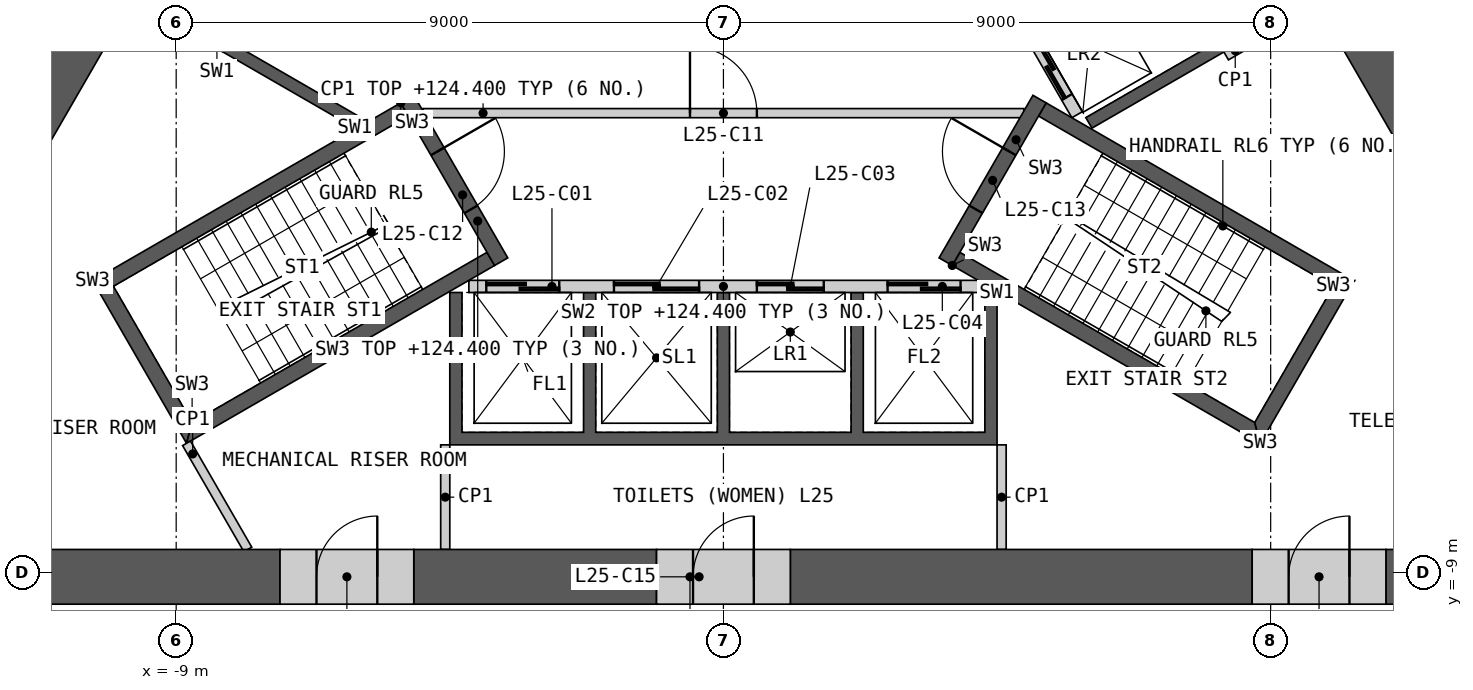
"""IFC4 building model, lengths in metres.
Left out: names, types, materials, properties, quantities, classifications, styles, units other than length and angle.
Written with IfcOpenShell. Run it as: python <this file> out.ifc"""

import sys

from ifc_helpers import new_model, si_unit, direction, frame, frame_2d, origin, place, context, subcontext, project, spatial, polyline, rectangle, outline, extrude, element, fill, save


model = new_model("IFC4")
c1 = context("Model", 3, precision=1e-05, world=origin(), true_north=direction((0.0, 1.0)))
c2 = subcontext(c1, "Body", "Model", "MODEL_VIEW")
j1 = project(units=[si_unit("LENGTHUNIT", "METRE"), si_unit("PLANEANGLEUNIT", "RADIAN")], contexts=[c1])
p1 = place(None, origin())
s1 = spatial("IfcSite", under=j1, at=p1, CompositionType="ELEMENT")
p2 = place(p1, origin())
s2 = spatial("IfcBuilding", under=s1, at=p2, CompositionType="ELEMENT")
p3 = place(p2, frame((0.0, 0.0, 120.6)))
s3 = spatial("IfcBuildingStorey", under=s2, at=p3, CompositionType="ELEMENT", Elevation=120.6)
p4 = place(p3, origin())
e1 = element("IfcWall", 1, at=p4, inside=s3, PredefinedType="SHEAR", context=c2, shape_type="SweptSolid", body=[
    extrude(outline(polyline([(4.5, -4.4), (4.5, -6.906), (-4.5, -6.906), (-4.5, -4.4), (-4.3, -4.4), (-4.3, -6.7), (-2.3, -6.7), (-2.3, -4.4), (-2.1, -4.4), (-2.1, -6.7), (-0.1, -6.7), (-0.1, -4.4), (0.1, -4.4), (0.1, -6.7), (2.1, -6.7), (2.1, -4.4), (2.3, -4.4), (2.3, -6.7), (4.3, -6.7), (4.3, -4.4), (4.5, -4.4)])), origin(), (0.0, 0.0, 1.0), 3.8),
])
p5 = place(p3, frame((-4.187, -4.3, 0.0), z_axis=(0.0, 0.0, 1.0), x_axis=(1.0, 0.0, 0.0)))
e2 = element("IfcWall", 2, at=p5, inside=s3, PredefinedType="SOLIDWALL", context=c2, shape_type="SweptSolid", body=[
    extrude(rectangle(XDim=8.373, YDim=0.2, at=frame_2d((4.187, 0.0))), origin(), (0.0, 0.0, 1.0), 3.8),
])
p6 = place(p5, frame((0.287, 0.0, 0.0)))
e3 = element("IfcOpeningElement", 3, at=p6, cuts=e2, PredefinedType="OPENING", context=c2, shape_type="SweptSolid", body=[
    extrude(rectangle(XDim=1.2, YDim=2.1, at=frame_2d((0.6, 1.05))), frame((0.0, 0.11, 0.0), z_axis=(0.0, -1.0, 0.0), x_axis=(1.0, 0.0, 0.0)), (0.0, 0.0, 1.0), 0.22),
])
p7 = place(p5, frame((2.387, 0.0, 0.0)))
e4 = element("IfcOpeningElement", 4, at=p7, cuts=e2, PredefinedType="OPENING", context=c2, shape_type="SweptSolid", body=[
    extrude(rectangle(XDim=1.4, YDim=2.1, at=frame_2d((0.7, 1.05))), frame((0.0, 0.11, 0.0), z_axis=(0.0, -1.0, 0.0), x_axis=(1.0, 0.0, 0.0)), (0.0, 0.0, 1.0), 0.22),
])
p8 = place(p5, frame((4.737, 0.0, 0.0)))
e5 = element("IfcOpeningElement", 5, at=p8, cuts=e2, PredefinedType="OPENING", context=c2, shape_type="SweptSolid", body=[
    extrude(rectangle(XDim=1.1, YDim=2.1, at=frame_2d((0.55, 1.05))), frame((0.0, 0.11, 0.0), z_axis=(0.0, -1.0, 0.0), x_axis=(1.0, 0.0, 0.0)), (0.0, 0.0, 1.0), 0.22),
])
p9 = place(p5, frame((6.887, 0.0, 0.0)))
e6 = element("IfcOpeningElement", 6, at=p9, cuts=e2, PredefinedType="OPENING", context=c2, shape_type="SweptSolid", body=[
    extrude(rectangle(XDim=1.2, YDim=2.1, at=frame_2d((0.6, 1.05))), frame((0.0, 0.11, 0.0), z_axis=(0.0, -1.0, 0.0), x_axis=(1.0, 0.0, 0.0)), (0.0, 0.0, 1.0), 0.22),
])
p10 = place(p3, origin())
e7 = element("IfcWall", 7, at=p10, inside=s3, PredefinedType="SHEAR", context=c2, shape_type="SweptSolid", body=[
    extrude(outline(polyline([(2.66, 4.192), (4.831, 5.445), (8.231, -0.444), (6.061, -1.697), (5.96, -1.524), (7.952, -0.374), (6.952, 1.358), (4.96, 0.208), (4.861, 0.381), (6.852, 1.531), (5.852, 3.263), (3.861, 2.113), (3.76, 2.287), (5.752, 3.437), (4.752, 5.169), (2.76, 4.019), (2.66, 4.192)])), origin(), (0.0, 0.0, 1.0), 3.8),
])
p11 = place(p3, frame((5.817, -1.476, 0.0), z_axis=(0.0, 0.0, 1.0), x_axis=(-0.500002616675, 0.866023893041, 0.0)))
e8 = element("IfcWall", 8, at=p11, inside=s3, PredefinedType="SOLIDWALL", context=c2, shape_type="SweptSolid", body=[
    extrude(rectangle(XDim=8.373, YDim=0.2, at=frame_2d((4.187, 0.0))), origin(), (0.0, 0.0, 1.0), 3.8),
])
p12 = place(p11, frame((0.337, 0.0, 0.0)))
e9 = element("IfcOpeningElement", 9, at=p12, cuts=e8, PredefinedType="OPENING", context=c2, shape_type="SweptSolid", body=[
    extrude(rectangle(XDim=1.1, YDim=2.1, at=frame_2d((0.55, 1.05))), frame((0.0, 0.11, 0.0), z_axis=(0.0, -1.0, 0.0), x_axis=(1.0, 0.0, 0.0)), (0.0, 0.0, 1.0), 0.22),
])
p13 = place(p11, frame((2.537, 0.0, 0.0)))
e10 = element("IfcOpeningElement", 10, at=p13, cuts=e8, PredefinedType="OPENING", context=c2, shape_type="SweptSolid", body=[
    extrude(rectangle(XDim=1.1, YDim=2.1, at=frame_2d((0.55, 1.05))), frame((0.0, 0.11, 0.0), z_axis=(0.0, -1.0, 0.0), x_axis=(1.0, 0.0, 0.0)), (0.0, 0.0, 1.0), 0.22),
])
p14 = place(p11, frame((4.737, 0.0, 0.0)))
e11 = element("IfcOpeningElement", 11, at=p14, cuts=e8, PredefinedType="OPENING", context=c2, shape_type="SweptSolid", body=[
    extrude(rectangle(XDim=1.1, YDim=2.1, at=frame_2d((0.55, 1.05))), frame((0.0, 0.11, 0.0), z_axis=(0.0, -1.0, 0.0), x_axis=(1.0, 0.0, 0.0)), (0.0, 0.0, 1.0), 0.22),
])
p15 = place(p11, frame((7.037, 0.0, 0.0)))
e12 = element("IfcOpeningElement", 12, at=p15, cuts=e8, PredefinedType="OPENING", context=c2, shape_type="SweptSolid", body=[
    extrude(rectangle(XDim=0.9, YDim=2.1, at=frame_2d((0.45, 1.05))), frame((0.0, 0.11, 0.0), z_axis=(0.0, -1.0, 0.0), x_axis=(1.0, 0.0, 0.0)), (0.0, 0.0, 1.0), 0.22),
])
p16 = place(p3, origin())
e13 = element("IfcWall", 13, at=p16, inside=s3, PredefinedType="SHEAR", context=c2, shape_type="SweptSolid", body=[
    extrude(outline(polyline([(-6.061, -1.697), (-8.231, -0.444), (-8.131, -0.271), (-5.96, -1.524), (-6.061, -1.697)])), origin(), (0.0, 0.0, 1.0), 3.8),
])
p17 = place(p3, frame((-4.941, -1.45, 0.0), z_axis=(0.0, 0.0, 1.0), x_axis=(1.0, 0.0, 0.0)))
e14 = element("IfcWall", 14, at=p17, inside=s3, PredefinedType="PARTITIONING", context=c2, shape_type="SweptSolid", body=[
    extrude(rectangle(XDim=9.882, YDim=0.15, at=frame_2d((4.941, 0.0))), origin(), (0.0, 0.0, 1.0), 3.8),
])
p18 = place(p17, frame((4.391, 0.0, 0.0)))
e15 = element("IfcOpeningElement", 15, at=p18, cuts=e14, PredefinedType="OPENING", context=c2, shape_type="SweptSolid", body=[
    extrude(rectangle(XDim=1.1, YDim=2.1, at=frame_2d((0.55, 1.05))), frame((0.0, 0.085, 0.0), z_axis=(0.0, -1.0, 0.0), x_axis=(1.0, 0.0, 0.0)), (0.0, 0.0, 1.0), 0.17),
])
p19 = place(p3, origin())
e16 = element("IfcWall", 16, at=p19, inside=s3, PredefinedType="SHEAR", context=c2, shape_type="SweptSolid", body=[
    extrude(outline(polyline([(-5.307, -1.281), (-10.374, -4.206), (-10.032, -4.298), (-5.182, -1.498), (-5.307, -1.281)])), origin(), (0.0, 0.0, 1.0), 3.8),
])
p20 = place(p3, origin())
e17 = element("IfcWall", 17, at=p20, inside=s3, PredefinedType="SHEAR", context=c2, shape_type="SweptSolid", body=[
    extrude(outline(polyline([(-10.374, -4.206), (-8.83, -6.881), (-8.738, -6.539), (-10.032, -4.298), (-10.374, -4.206)])), origin(), (0.0, 0.0, 1.0), 3.8),
])
p21 = place(p3, origin())
e18 = element("IfcWall", 18, at=p21, inside=s3, PredefinedType="SHEAR", context=c2, shape_type="SweptSolid", body=[
    extrude(outline(polyline([(-8.738, -6.539), (-8.83, -6.881), (-3.763, -3.956), (-3.888, -3.739), (-8.738, -6.539)])), origin(), (0.0, 0.0, 1.0), 3.8),
])
p22 = place(p3, frame((-5.199, -1.219, 0.0), z_axis=(0.0, 0.0, 1.0), x_axis=(0.499982516597, -0.866035497597, 0.0)))
e19 = element("IfcWall", 19, at=p22, inside=s3, PredefinedType="SHEAR", context=c2, shape_type="SweptSolid", body=[
    extrude(rectangle(XDim=3.088, YDim=0.25, at=frame_2d((1.544, 0.0))), origin(), (0.0, 0.0, 1.0), 3.8),
])
p23 = place(p22, frame((0.994, 0.0, 0.0)))
e20 = element("IfcOpeningElement", 20, at=p23, cuts=e19, PredefinedType="OPENING", context=c2, shape_type="SweptSolid", body=[
    extrude(rectangle(XDim=1.1, YDim=2.1, at=frame_2d((0.55, 1.05))), frame((0.0, 0.135, 0.0), z_axis=(0.0, -1.0, 0.0), x_axis=(1.0, 0.0, 0.0)), (0.0, 0.0, 1.0), 0.27),
])
p24 = place(p3, origin())
e21 = element("IfcWall", 21, at=p24, inside=s3, PredefinedType="SHEAR", context=c2, shape_type="SweptSolid", body=[
    extrude(outline(polyline([(3.763, -3.956), (8.83, -6.881), (8.738, -6.539), (3.888, -3.739), (3.763, -3.956)])), origin(), (0.0, 0.0, 1.0), 3.8),
])
p25 = place(p3, origin())
e22 = element("IfcWall", 22, at=p25, inside=s3, PredefinedType="SHEAR", context=c2, shape_type="SweptSolid", body=[
    extrude(outline(polyline([(8.83, -6.881), (10.374, -4.206), (10.032, -4.298), (8.738, -6.539), (8.83, -6.881)])), origin(), (0.0, 0.0, 1.0), 3.8),
])
p26 = place(p3, origin())
e23 = element("IfcWall", 23, at=p26, inside=s3, PredefinedType="SHEAR", context=c2, shape_type="SweptSolid", body=[
    extrude(outline(polyline([(10.032, -4.298), (10.374, -4.206), (5.307, -1.281), (5.182, -1.498), (10.032, -4.298)])), origin(), (0.0, 0.0, 1.0), 3.8),
])
p27 = place(p3, frame((3.655, -3.893, 0.0), z_axis=(0.0, 0.0, 1.0), x_axis=(0.499982516597, 0.866035497597, 0.0)))
e24 = element("IfcWall", 24, at=p27, inside=s3, PredefinedType="SHEAR", context=c2, shape_type="SweptSolid", body=[
    extrude(rectangle(XDim=3.088, YDim=0.25, at=frame_2d((1.544, 0.0))), origin(), (0.0, 0.0, 1.0), 3.8),
])
p28 = place(p27, frame((0.994, 0.0, 0.0)))
e25 = element("IfcOpeningElement", 25, at=p28, cuts=e24, PredefinedType="OPENING", context=c2, shape_type="SweptSolid", body=[
    extrude(rectangle(XDim=1.1, YDim=2.1, at=frame_2d((0.55, 1.05))), frame((0.0, 0.135, 0.0), z_axis=(0.0, -1.0, 0.0), x_axis=(1.0, 0.0, 0.0)), (0.0, 0.0, 1.0), 0.27),
])
for number, where, z_axis, x_axis in (
    (26, (4.575, -6.906, 0.0), (0.0, 0.0, 1.0), (0.0, -1.0, 0.0)),
    (27, (-4.575, -6.906, 0.0), (0.0, 0.0, 1.0), (0.0, -1.0, 0.0)),
    (28, (8.268, -0.509, 0.0), (0.0, 0.0, 1.0), (0.866, 0.5, 0.0)),
):
    element("IfcWall", number, at=place(p3, frame(where, z_axis=z_axis, x_axis=x_axis)), inside=s3, PredefinedType="PARTITIONING", context=c2, shape_type="SweptSolid", body=[
        extrude(rectangle(XDim=1.72, YDim=0.15, at=frame_2d((0.86, 0.0))), origin(), (0.0, 0.0, 1.0), 3.8),
    ])
p29 = place(p3, frame((-8.83, -6.881, 0.0), z_axis=(0.0, 0.0, 1.0), x_axis=(0.500085890408, -0.865975809255, 0.0)))
e29 = element("IfcWall", 29, at=p29, inside=s3, PredefinedType="PARTITIONING", context=c2, shape_type="SweptSolid", body=[
    extrude(rectangle(XDim=2.016, YDim=0.15, at=frame_2d((1.008, 0.0))), origin(), (0.0, 0.0, 1.0), 3.8),
])
p30 = place(p3, frame((-14.941, -9.076, 0.0), z_axis=(0.0, 0.0, 1.0), x_axis=(1.0, 0.0, 0.0)))
e30 = element("IfcWall", 30, at=p30, inside=s3, PredefinedType="SHEAR", context=c2, shape_type="SweptSolid", body=[
    extrude(rectangle(XDim=7.649, YDim=0.9, at=frame_2d((3.824, 0.0))), origin(), (0.0, 0.0, 1.0), 3.8),
])
p31 = place(p3, frame((1.1, -9.076, 0.0), z_axis=(0.0, 0.0, 1.0), x_axis=(1.0, 0.0, 0.0)))
e31 = element("IfcWall", 31, at=p31, inside=s3, PredefinedType="SHEAR", context=c2, shape_type="SweptSolid", body=[
    extrude(rectangle(XDim=7.595, YDim=0.9, at=frame_2d((3.798, 0.0))), origin(), (0.0, 0.0, 1.0), 3.8),
])
p32 = place(p3, frame((10.896, -9.076, 0.0), z_axis=(0.0, 0.0, 1.0), x_axis=(1.0, 0.0, 0.0)))
e32 = element("IfcWall", 32, at=p32, inside=s3, PredefinedType="SHEAR", context=c2, shape_type="SweptSolid", body=[
    extrude(rectangle(XDim=4.046, YDim=0.9, at=frame_2d((2.023, 0.0))), origin(), (0.0, 0.0, 1.0), 3.8),
])
p33 = place(p3, frame((-5.093, -9.076, 0.0), z_axis=(0.0, 0.0, 1.0), x_axis=(1.0, 0.0, 0.0)))
e33 = element("IfcWall", 33, at=p33, inside=s3, PredefinedType="SHEAR", context=c2, shape_type="SweptSolid", body=[
    extrude(rectangle(XDim=3.992, YDim=0.9, at=frame_2d((1.996, 0.0))), origin(), (0.0, 0.0, 1.0), 3.8),
])
p34 = place(p3, frame((15.331, -8.401, 0.0), z_axis=(0.0, 0.0, 1.0), x_axis=(-0.49999216708, 0.866029926076, 0.0)))
e34 = element("IfcWall", 34, at=p34, inside=s3, PredefinedType="SHEAR", context=c2, shape_type="SweptSolid", body=[
    extrude(rectangle(XDim=12.641, YDim=0.9, at=frame_2d((6.321, 0.0))), origin(), (0.0, 0.0, 1.0), 3.8),
])
p35 = place(p3, frame((-10.06, 0.728, 0.0), z_axis=(0.0, 0.0, 1.0), x_axis=(-0.500021220092, -0.866013152012, 0.0)))
e35 = element("IfcWall", 35, at=p35, inside=s3, PredefinedType="SHEAR", context=c2, shape_type="SweptSolid", body=[
    extrude(rectangle(XDim=4.22, YDim=0.9, at=frame_2d((2.11, 0.0))), origin(), (0.0, 0.0, 1.0), 3.8),
])
p36 = place(p3, frame((-1.1, -9.076, 0.0), z_axis=(0.0, 0.0, 1.0), x_axis=(1.0, 0.0, 0.0)))
e36 = element("IfcWall", 36, at=p36, inside=s3, PredefinedType="SHEAR", context=c2, shape_type="SweptSolid", body=[
    extrude(rectangle(XDim=2.2, YDim=0.9, at=frame_2d((1.1, 0.0))), origin(), (0.0, 0.0, 1.0), 3.8),
])
p37 = place(p36, frame((0.6, 0.0, 0.0)))
e37 = element("IfcOpeningElement", 37, at=p37, cuts=e36, PredefinedType="OPENING", context=c2, shape_type="SweptSolid", body=[
    extrude(rectangle(XDim=1.0, YDim=2.1, at=frame_2d((0.5, 1.05))), frame((0.0, 0.46, 0.0), z_axis=(0.0, -1.0, 0.0), x_axis=(1.0, 0.0, 0.0)), (0.0, 0.0, 1.0), 0.92),
])
p38 = place(p3, frame((8.696, -9.076, 0.0), z_axis=(0.0, 0.0, 1.0), x_axis=(1.0, 0.0, 0.0)))
e38 = element("IfcWall", 38, at=p38, inside=s3, PredefinedType="SHEAR", context=c2, shape_type="SweptSolid", body=[
    extrude(rectangle(XDim=2.2, YDim=0.9, at=frame_2d((1.1, 0.0))), origin(), (0.0, 0.0, 1.0), 3.8),
])
p39 = place(p38, frame((0.6, 0.0, 0.0)))
e39 = element("IfcOpeningElement", 39, at=p39, cuts=e38, PredefinedType="OPENING", context=c2, shape_type="SweptSolid", body=[
    extrude(rectangle(XDim=1.0, YDim=2.1, at=frame_2d((0.5, 1.05))), frame((0.0, 0.46, 0.0), z_axis=(0.0, -1.0, 0.0), x_axis=(1.0, 0.0, 0.0)), (0.0, 0.0, 1.0), 0.92),
])
p40 = place(p3, frame((-7.292, -9.076, 0.0), z_axis=(0.0, 0.0, 1.0), x_axis=(1.0, 0.0, 0.0)))
e40 = element("IfcWall", 40, at=p40, inside=s3, PredefinedType="SHEAR", context=c2, shape_type="SweptSolid", body=[
    extrude(rectangle(XDim=2.2, YDim=0.9, at=frame_2d((1.1, 0.0))), origin(), (0.0, 0.0, 1.0), 3.8),
])
p41 = place(p40, frame((0.6, 0.0, 0.0)))
e41 = element("IfcOpeningElement", 41, at=p41, cuts=e40, PredefinedType="OPENING", context=c2, shape_type="SweptSolid", body=[
    extrude(rectangle(XDim=1.0, YDim=2.1, at=frame_2d((0.5, 1.05))), frame((0.0, 0.46, 0.0), z_axis=(0.0, -1.0, 0.0), x_axis=(1.0, 0.0, 0.0)), (0.0, 0.0, 1.0), 0.92),
])
p42 = place(p3, frame((10.46, 5.736, 0.0), z_axis=(0.0, 0.0, 1.0), x_axis=(0.500004141693, -0.866023012564, 0.0)))
e42 = element("IfcWall", 42, at=p42, inside=s3, PredefinedType="PARTITIONING", context=c2, shape_type="SweptSolid", body=[
    extrude(rectangle(XDim=9.803, YDim=0.2, at=frame_2d((4.902, 0.0))), origin(), (0.0, 0.0, 1.0), 3.8),
])
p43 = place(p42, frame((4.352, 0.0, 0.0)))
e43 = element("IfcOpeningElement", 43, at=p43, cuts=e42, PredefinedType="OPENING", context=c2, shape_type="SweptSolid", body=[
    extrude(rectangle(XDim=1.0, YDim=2.1, at=frame_2d((0.5, 1.05))), frame((0.0, 0.11, 0.0), z_axis=(0.0, -1.0, 0.0), x_axis=(1.0, 0.0, 0.0)), (0.0, 0.0, 1.0), 0.22),
])
p44 = place(p3, frame((-15.402, -2.823, 0.0), z_axis=(0.0, 0.0, 1.0), x_axis=(0.500023237168, 0.866011987384, 0.0)))
e44 = element("IfcWall", 44, at=p44, inside=s3, PredefinedType="PARTITIONING", context=c2, shape_type="SweptSolid", body=[
    extrude(rectangle(XDim=9.883, YDim=0.2, at=frame_2d((4.942, 0.0))), origin(), (0.0, 0.0, 1.0), 3.8),
])
p45 = place(p44, frame((4.492, 0.0, 0.0)))
e45 = element("IfcOpeningElement", 45, at=p45, cuts=e44, PredefinedType="OPENING", context=c2, shape_type="SweptSolid", body=[
    extrude(rectangle(XDim=1.0, YDim=2.1, at=frame_2d((0.5, 1.05))), frame((0.0, 0.11, 0.0), z_axis=(0.0, -1.0, 0.0), x_axis=(1.0, 0.0, 0.0)), (0.0, 0.0, 1.0), 0.22),
])
p46 = place(p6, origin())
e46 = element("IfcDoor", 46, at=p46, inside=s3, OperationType="SLIDING_TO_LEFT", PredefinedType="DOOR", context=c2, shape_type="SweptSolid", body=[
    extrude(rectangle(XDim=1.2, YDim=2.1, at=frame_2d((0.6, 1.05))), frame((0.0, 0.025, 0.0), z_axis=(0.0, -1.0, 0.0), x_axis=(1.0, 0.0, 0.0)), (0.0, 0.0, 1.0), 0.05),
])
fill(e3, e46)
p47 = place(p7, origin())
e47 = element("IfcDoor", 47, at=p47, inside=s3, OperationType="SLIDING_TO_LEFT", PredefinedType="DOOR", context=c2, shape_type="SweptSolid", body=[
    extrude(rectangle(XDim=1.4, YDim=2.1, at=frame_2d((0.7, 1.05))), frame((0.0, 0.025, 0.0), z_axis=(0.0, -1.0, 0.0), x_axis=(1.0, 0.0, 0.0)), (0.0, 0.0, 1.0), 0.05),
])
fill(e4, e47)
p48 = place(p8, origin())
e48 = element("IfcDoor", 48, at=p48, inside=s3, OperationType="SLIDING_TO_LEFT", PredefinedType="DOOR", context=c2, shape_type="SweptSolid", body=[
    extrude(rectangle(XDim=1.1, YDim=2.1, at=frame_2d((0.55, 1.05))), frame((0.0, 0.025, 0.0), z_axis=(0.0, -1.0, 0.0), x_axis=(1.0, 0.0, 0.0)), (0.0, 0.0, 1.0), 0.05),
])
fill(e5, e48)
p49 = place(p9, origin())
e49 = element("IfcDoor", 49, at=p49, inside=s3, OperationType="SLIDING_TO_LEFT", PredefinedType="DOOR", context=c2, shape_type="SweptSolid", body=[
    extrude(rectangle(XDim=1.2, YDim=2.1, at=frame_2d((0.6, 1.05))), frame((0.0, 0.025, 0.0), z_axis=(0.0, -1.0, 0.0), x_axis=(1.0, 0.0, 0.0)), (0.0, 0.0, 1.0), 0.05),
])
fill(e6, e49)
p50 = place(p12, origin())
e50 = element("IfcDoor", 50, at=p50, inside=s3, OperationType="SLIDING_TO_LEFT", PredefinedType="DOOR", context=c2, shape_type="SweptSolid", body=[
    extrude(rectangle(XDim=1.1, YDim=2.1, at=frame_2d((0.55, 1.05))), frame((0.0, 0.025, 0.0), z_axis=(0.0, -1.0, 0.0), x_axis=(1.0, 0.0, 0.0)), (0.0, 0.0, 1.0), 0.05),
])
fill(e9, e50)
p51 = place(p18, origin())
e51 = element("IfcDoor", 51, at=p51, inside=s3, OperationType="SINGLE_SWING_LEFT", PredefinedType="DOOR", context=c2, shape_type="SweptSolid", body=[
    extrude(rectangle(XDim=1.1, YDim=2.1, at=frame_2d((0.55, 1.05))), frame((0.0, 0.025, 0.0), z_axis=(0.0, -1.0, 0.0), x_axis=(1.0, 0.0, 0.0)), (0.0, 0.0, 1.0), 0.05),
])
fill(e15, e51)
p52 = place(p23, origin())
e52 = element("IfcDoor", 52, at=p52, inside=s3, OperationType="SINGLE_SWING_LEFT", PredefinedType="DOOR", context=c2, shape_type="SweptSolid", body=[
    extrude(rectangle(XDim=1.1, YDim=2.1, at=frame_2d((0.55, 1.05))), frame((0.0, 0.025, 0.0), z_axis=(0.0, -1.0, 0.0), x_axis=(1.0, 0.0, 0.0)), (0.0, 0.0, 1.0), 0.05),
])
fill(e20, e52)
p53 = place(p28, origin())
e53 = element("IfcDoor", 53, at=p53, inside=s3, OperationType="SINGLE_SWING_RIGHT", PredefinedType="DOOR", context=c2, shape_type="SweptSolid", body=[
    extrude(rectangle(XDim=1.1, YDim=2.1, at=frame_2d((0.55, 1.05))), frame((0.0, 0.025, 0.0), z_axis=(0.0, -1.0, 0.0), x_axis=(1.0, 0.0, 0.0)), (0.0, 0.0, 1.0), 0.05),
])
fill(e25, e53)
p54 = place(p37, origin())
e54 = element("IfcDoor", 54, at=p54, inside=s3, OperationType="SINGLE_SWING_RIGHT", PredefinedType="DOOR", context=c2, shape_type="SweptSolid", body=[
    extrude(rectangle(XDim=1.0, YDim=2.1, at=frame_2d((0.5, 1.05))), frame((0.0, 0.205, 0.0), z_axis=(0.0, -1.0, 0.0), x_axis=(1.0, 0.0, 0.0)), (0.0, 0.0, 1.0), 0.05),
])
fill(e37, e54)
p55 = place(p39, origin())
e55 = element("IfcDoor", 55, at=p55, inside=s3, OperationType="SINGLE_SWING_RIGHT", PredefinedType="DOOR", context=c2, shape_type="SweptSolid", body=[
    extrude(rectangle(XDim=1.0, YDim=2.1, at=frame_2d((0.5, 1.05))), frame((0.0, 0.205, 0.0), z_axis=(0.0, -1.0, 0.0), x_axis=(1.0, 0.0, 0.0)), (0.0, 0.0, 1.0), 0.05),
])
fill(e39, e55)
p56 = place(p41, origin())
e56 = element("IfcDoor", 56, at=p56, inside=s3, OperationType="SINGLE_SWING_RIGHT", PredefinedType="DOOR", context=c2, shape_type="SweptSolid", body=[
    extrude(rectangle(XDim=1.0, YDim=2.1, at=frame_2d((0.5, 1.05))), frame((0.0, 0.205, 0.0), z_axis=(0.0, -1.0, 0.0), x_axis=(1.0, 0.0, 0.0)), (0.0, 0.0, 1.0), 0.05),
])
fill(e41, e56)
save(model, sys.argv[1])
